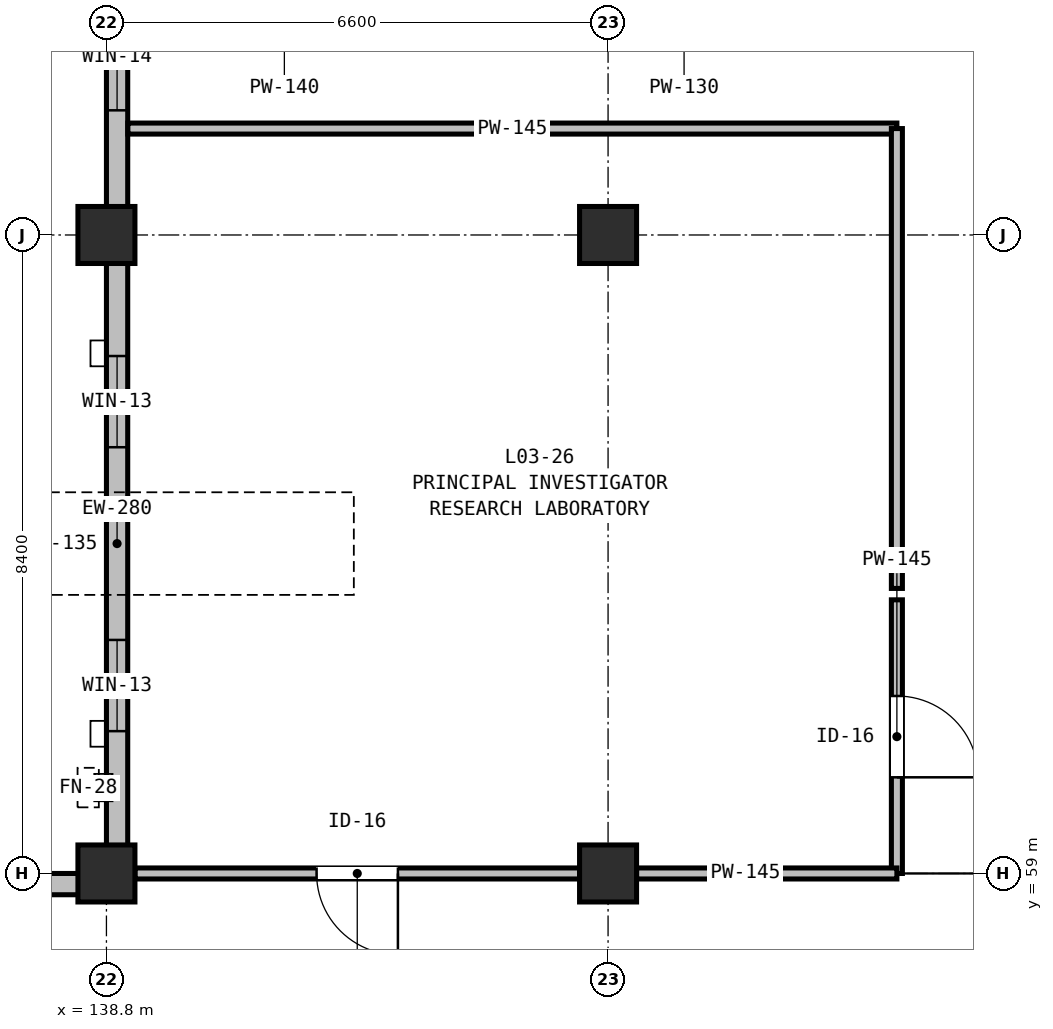
"""IFC4 building model, lengths in metres.
Left out: names, types, materials, properties, quantities, classifications, styles, units other than length and angle.
Written with IfcOpenShell. Run it as: python <this file> out.ifc"""

import sys

from ifc_helpers import new_model, si_unit, direction, frame, frame_2d, origin, origin_2d, place, context, subcontext, project, spatial, rectangle, extrude, element, fill, save


model = new_model("IFC4")
c1 = context("Model", 3, precision=1e-05, world=origin(), true_north=direction((0.0, 1.0)))
c2 = subcontext(c1, "Body", "Model", "MODEL_VIEW")
j1 = project(units=[si_unit("LENGTHUNIT", "METRE"), si_unit("PLANEANGLEUNIT", "RADIAN")], contexts=[c1])
p1 = place(None, origin())
s1 = spatial("IfcSite", under=j1, at=p1, CompositionType="ELEMENT")
p2 = place(p1, origin())
s2 = spatial("IfcBuilding", under=s1, at=p2, CompositionType="ELEMENT")
p3 = place(p2, frame((0.0, 0.0, 15.0)))
s3 = spatial("IfcBuildingStorey", under=s2, at=p3, CompositionType="ELEMENT", Elevation=15.0)
for number, where, z_axis, x_axis in (
    (1, (138.8, 59.0, 0.0), (0.0, 0.0, 1.0), (1.0, 0.0, 0.0)),
    (2, (138.8, 67.4, 0.0), (0.0, 0.0, 1.0), (1.0, 0.0, 0.0)),
    (3, (145.4, 59.0, 0.0), (0.0, 0.0, 1.0), (1.0, 0.0, 0.0)),
    (4, (145.4, 67.4, 0.0), (0.0, 0.0, 1.0), (1.0, 0.0, 0.0)),
):
    element("IfcColumn", number, at=place(p3, frame(where, z_axis=z_axis, x_axis=x_axis)), inside=s3, PredefinedType="COLUMN", context=c2, shape_type="SweptSolid", body=[
        extrude(rectangle(XDim=0.75, YDim=0.75, at=origin_2d()), origin(), (0.0, 0.0, 1.0), 4.5),
    ])
p4 = place(p3, frame((135.2, 58.86, 0.0), z_axis=(0.0, 0.0, 1.0), x_axis=(1.0, 0.0, 0.0)))
e5 = element("IfcWall", 5, at=p4, inside=s3, PredefinedType="STANDARD", context=c2, shape_type="SweptSolid", body=[
    extrude(rectangle(XDim=3.6, YDim=0.28, at=frame_2d((1.8, 0.0))), origin(), (0.0, 0.0, 1.0), 3.735),
])
p5 = place(p3, frame((138.94, 59.28, 0.0), z_axis=(0.0, 0.0, 1.0), x_axis=(0.0, 1.0, 0.0)))
e6 = element("IfcWall", 6, at=p5, inside=s3, PredefinedType="STANDARD", context=c2, shape_type="SweptSolid", body=[
    extrude(rectangle(XDim=8.12, YDim=0.28, at=frame_2d((4.06, 0.0))), origin(), (0.0, 0.0, 1.0), 3.785),
])
p6 = place(p5, frame((1.592, 0.0, 0.9)))
e7 = element("IfcOpeningElement", 7, at=p6, cuts=e6, PredefinedType="OPENING", context=c2, shape_type="SweptSolid", body=[
    extrude(rectangle(XDim=1.2, YDim=1.5, at=frame_2d((0.6, 0.75))), frame((0.0, 0.15, 0.0), z_axis=(0.0, -1.0, 0.0), x_axis=(1.0, 0.0, 0.0)), (0.0, 0.0, 1.0), 0.3),
])
p7 = place(p5, frame((5.328, 0.0, 0.9)))
e8 = element("IfcOpeningElement", 8, at=p7, cuts=e6, PredefinedType="OPENING", context=c2, shape_type="SweptSolid", body=[
    extrude(rectangle(XDim=1.2, YDim=1.5, at=frame_2d((0.6, 0.75))), frame((0.0, 0.15, 0.0), z_axis=(0.0, -1.0, 0.0), x_axis=(1.0, 0.0, 0.0)), (0.0, 0.0, 1.0), 0.3),
])
p8 = place(p3, frame((138.94, 67.4, 0.0), z_axis=(0.0, 0.0, 1.0), x_axis=(0.0, 1.0, 0.0)))
e9 = element("IfcWall", 9, at=p8, inside=s3, PredefinedType="STANDARD", context=c2, shape_type="SweptSolid", body=[
    extrude(rectangle(XDim=8.4, YDim=0.28, at=frame_2d((4.2, 0.0))), origin(), (0.0, 0.0, 1.0), 3.785),
])
p9 = place(p8, frame((1.64, 0.0, 0.9)))
e10 = element("IfcOpeningElement", 10, at=p9, cuts=e9, PredefinedType="OPENING", context=c2, shape_type="SweptSolid", body=[
    extrude(rectangle(XDim=1.4, YDim=1.55, at=frame_2d((0.7, 0.775))), frame((0.0, 0.15, 0.0), z_axis=(0.0, -1.0, 0.0), x_axis=(1.0, 0.0, 0.0)), (0.0, 0.0, 1.0), 0.3),
])
p10 = place(p8, frame((5.432, 0.0, 0.9)))
e11 = element("IfcOpeningElement", 11, at=p10, cuts=e9, PredefinedType="OPENING", context=c2, shape_type="SweptSolid", body=[
    extrude(rectangle(XDim=1.4, YDim=1.55, at=frame_2d((0.7, 0.775))), frame((0.0, 0.15, 0.0), z_axis=(0.0, -1.0, 0.0), x_axis=(1.0, 0.0, 0.0)), (0.0, 0.0, 1.0), 0.3),
])
p11 = place(p3, frame((149.2, 62.6, 0.0), z_axis=(0.0, 0.0, 1.0), x_axis=(0.0, -1.0, 0.0)))
e12 = element("IfcWall", 12, at=p11, inside=s3, PredefinedType="PARTITIONING", context=c2, shape_type="SweptSolid", body=[
    extrude(rectangle(XDim=3.6, YDim=0.145, at=frame_2d((1.8, 0.0))), origin(), (0.0, 0.0, 1.0), 3.835),
])
p12 = place(p11, frame((1.265, 0.0, 0.0)))
e13 = element("IfcOpeningElement", 13, at=p12, cuts=e12, PredefinedType="OPENING", context=c2, shape_type="SweptSolid", body=[
    extrude(rectangle(XDim=1.07, YDim=2.1, at=frame_2d((0.535, 1.05))), frame((0.0, 0.083, 0.0), z_axis=(0.0, -1.0, 0.0), x_axis=(1.0, 0.0, 0.0)), (0.0, 0.0, 1.0), 0.165),
])
p13 = place(p3, frame((149.2, 59.0, 0.0), z_axis=(0.0, 0.0, 1.0), x_axis=(-1.0, 0.0, 0.0)))
e14 = element("IfcWall", 14, at=p13, inside=s3, PredefinedType="PARTITIONING", context=c2, shape_type="SweptSolid", body=[
    extrude(rectangle(XDim=3.425, YDim=0.145, at=frame_2d((1.712, 0.0))), origin(), (0.0, 0.0, 1.0), 3.835),
])
p14 = place(p3, frame((145.025, 59.0, 0.0), z_axis=(0.0, 0.0, 1.0), x_axis=(-1.0, 0.0, 0.0)))
e15 = element("IfcWall", 15, at=p14, inside=s3, PredefinedType="PARTITIONING", context=c2, shape_type="SweptSolid", body=[
    extrude(rectangle(XDim=5.85, YDim=0.145, at=frame_2d((2.925, 0.0))), origin(), (0.0, 0.0, 1.0), 3.835),
])
p15 = place(p14, frame((2.39, 0.0, 0.0)))
e16 = element("IfcOpeningElement", 16, at=p15, cuts=e15, PredefinedType="OPENING", context=c2, shape_type="SweptSolid", body=[
    extrude(rectangle(XDim=1.07, YDim=2.1, at=frame_2d((0.535, 1.05))), frame((0.0, 0.083, 0.0), z_axis=(0.0, -1.0, 0.0), x_axis=(1.0, 0.0, 0.0)), (0.0, 0.0, 1.0), 0.165),
])
p16 = place(p3, frame((139.082, 68.8, 0.0), z_axis=(0.0, 0.0, 1.0), x_axis=(1.0, 0.0, 0.0)))
e17 = element("IfcWall", 17, at=p16, inside=s3, PredefinedType="PARTITIONING", context=c2, shape_type="SweptSolid", body=[
    extrude(rectangle(XDim=10.118, YDim=0.145, at=frame_2d((5.059, 0.0))), origin(), (0.0, 0.0, 1.0), 3.735),
])
p17 = place(p3, frame((149.2, 68.8, 0.0), z_axis=(0.0, 0.0, 1.0), x_axis=(0.0, -1.0, 0.0)))
e18 = element("IfcWall", 18, at=p17, inside=s3, PredefinedType="PARTITIONING", context=c2, shape_type="SweptSolid", body=[
    extrude(rectangle(XDim=6.05, YDim=0.145, at=frame_2d((3.025, 0.0))), origin(), (0.0, 0.0, 1.0), 3.835),
])
p18 = place(p6, origin())
e19 = element("IfcWindow", 19, at=p18, inside=s3, PartitioningType="SINGLE_PANEL", PredefinedType="WINDOW", context=c2, shape_type="SweptSolid", body=[
    extrude(rectangle(XDim=1.2, YDim=1.5, at=frame_2d((0.6, 0.75))), frame((0.0, 0.03, 0.0), z_axis=(0.0, -1.0, 0.0), x_axis=(1.0, 0.0, 0.0)), (0.0, 0.0, 1.0), 0.06),
])
fill(e7, e19)
p19 = place(p7, origin())
e20 = element("IfcWindow", 20, at=p19, inside=s3, PartitioningType="SINGLE_PANEL", PredefinedType="WINDOW", context=c2, shape_type="SweptSolid", body=[
    extrude(rectangle(XDim=1.2, YDim=1.5, at=frame_2d((0.6, 0.75))), frame((0.0, 0.03, 0.0), z_axis=(0.0, -1.0, 0.0), x_axis=(1.0, 0.0, 0.0)), (0.0, 0.0, 1.0), 0.06),
])
fill(e8, e20)
p20 = place(p9, origin())
e21 = element("IfcWindow", 21, at=p20, inside=s3, PartitioningType="SINGLE_PANEL", PredefinedType="WINDOW", context=c2, shape_type="SweptSolid", body=[
    extrude(rectangle(XDim=1.4, YDim=1.55, at=frame_2d((0.7, 0.775))), frame((0.0, 0.03, 0.0), z_axis=(0.0, -1.0, 0.0), x_axis=(1.0, 0.0, 0.0)), (0.0, 0.0, 1.0), 0.06),
])
fill(e10, e21)
p21 = place(p15, origin())
e22 = element("IfcDoor", 22, at=p21, inside=s3, OperationType="SINGLE_SWING_LEFT", PredefinedType="DOOR", context=c2, shape_type="SweptSolid", body=[
    extrude(rectangle(XDim=1.07, YDim=2.1, at=frame_2d((0.535, 1.05))), frame((0.0, 0.025, 0.0), z_axis=(0.0, -1.0, 0.0), x_axis=(1.0, 0.0, 0.0)), (0.0, 0.0, 1.0), 0.05),
])
fill(e16, e22)
p22 = place(p12, origin())
e23 = element("IfcDoor", 23, at=p22, inside=s3, OperationType="SINGLE_SWING_RIGHT", PredefinedType="DOOR", context=c2, shape_type="SweptSolid", body=[
    extrude(rectangle(XDim=1.07, YDim=2.1, at=frame_2d((0.535, 1.05))), frame((0.0, 0.025, 0.0), z_axis=(0.0, -1.0, 0.0), x_axis=(1.0, 0.0, 0.0)), (0.0, 0.0, 1.0), 0.05),
])
fill(e13, e23)
save(model, sys.argv[1])
